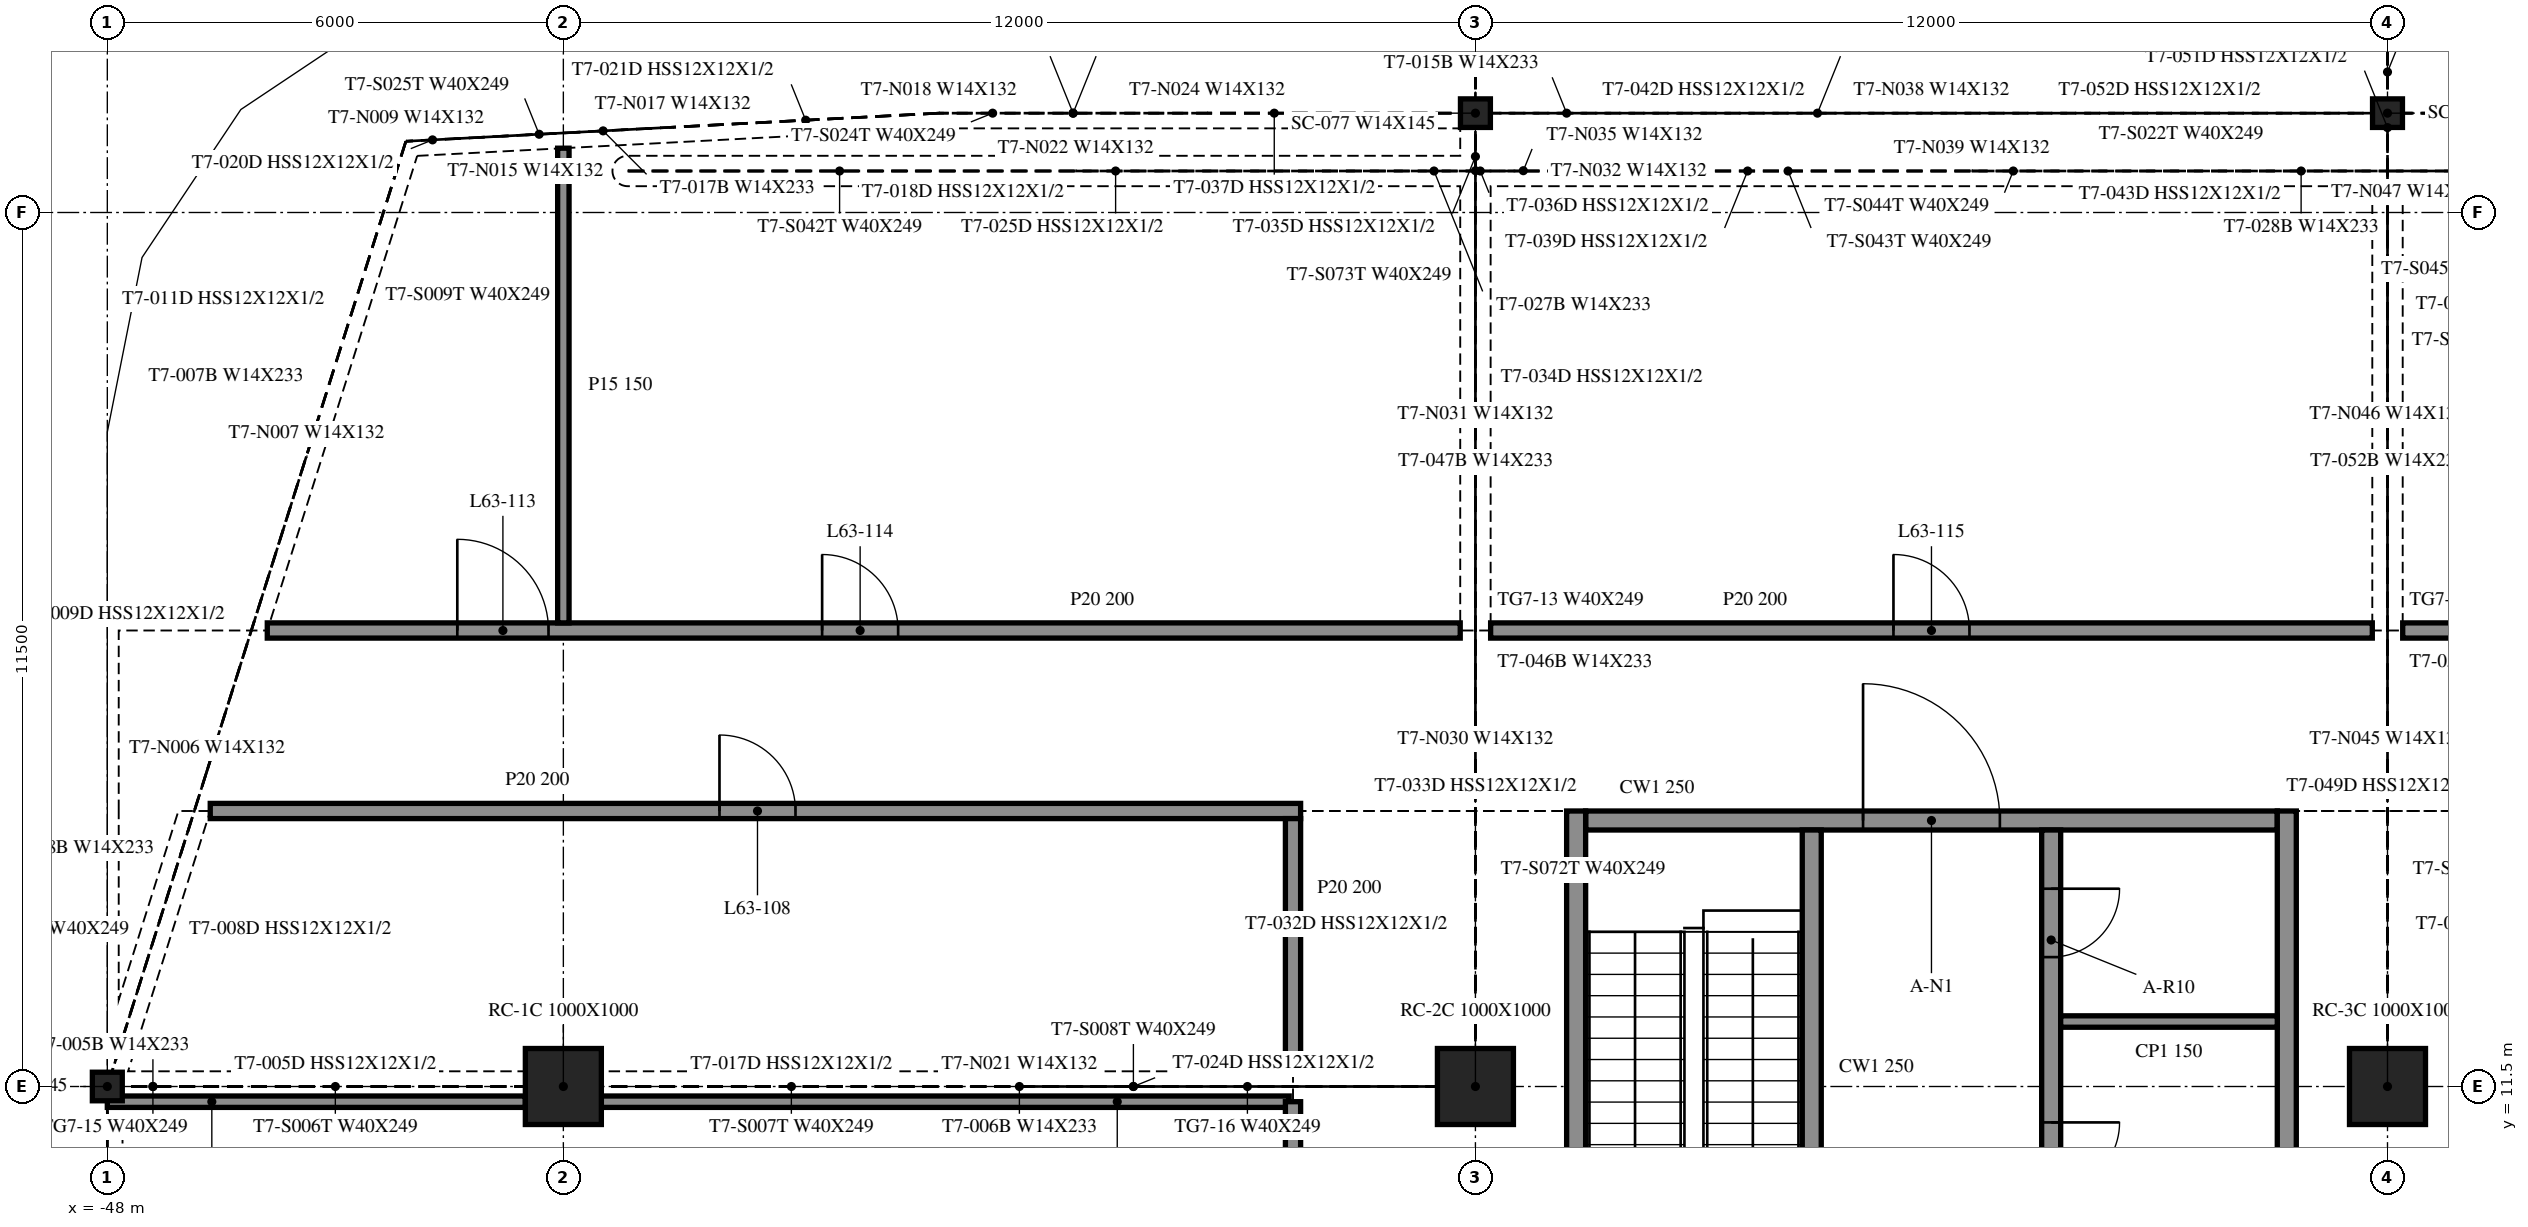
"""IFC4 building model, lengths in metres.
Left out: names, types, materials, properties, quantities, classifications, styles, units other than length and angle.
Written with IfcOpenShell. Run it as: python <this file> out.ifc"""

import sys

from ifc_helpers import new_model, si_unit, direction, frame, frame_2d, origin, origin_2d, place, context, subcontext, project, spatial, rectangle, i_section, extrude, element, fill, save


model = new_model("IFC4")
c1 = context("Model", 3, precision=1e-05, world=origin(), true_north=direction((0.0, 1.0)))
c2 = subcontext(c1, "Body", "Model", "MODEL_VIEW")
j1 = project(units=[si_unit("LENGTHUNIT", "METRE"), si_unit("PLANEANGLEUNIT", "RADIAN")], contexts=[c1])
p1 = place(None, origin())
s1 = spatial("IfcSite", under=j1, at=p1, CompositionType="ELEMENT")
p2 = place(p1, origin())
s2 = spatial("IfcBuilding", under=s1, at=p2, CompositionType="ELEMENT")
p3 = place(p2, frame((0.0, 0.0, 259.0)))
s3 = spatial("IfcBuildingStorey", under=s2, at=p3, CompositionType="ELEMENT", Elevation=259.0)
for number, where, z_axis, x_axis in (
    (1, (-42.0, 11.5, -0.4), (0.0, 0.0, 1.0), (1.0, 0.0, 0.0)),
    (2, (-30.0, 11.5, -0.4), (0.0, 0.0, 1.0), (1.0, 0.0, 0.0)),
    (3, (-18.0, 11.5, -0.4), (0.0, 0.0, 1.0), (1.0, 0.0, 0.0)),
):
    element("IfcColumn", number, at=place(p3, frame(where, z_axis=z_axis, x_axis=x_axis)), inside=s3, PredefinedType="COLUMN", context=c2, shape_type="SweptSolid", body=[
        extrude(rectangle(XDim=1.0, YDim=1.0, at=origin_2d()), origin(), (0.0, 0.0, 1.0), 4.36),
    ])
for number, where, z_axis, x_axis in (
    (4, (-18.0, 24.307, -0.4), (0.0, 0.0, 1.0), (1.0, 0.0, 0.0)),
    (5, (-30.0, 24.307, -0.4), (0.0, 0.0, 1.0), (1.0, 0.0, 0.0)),
    (6, (-48.0, 11.5, -0.4), (0.0, 0.0, 1.0), (1.0, 0.0, 0.0)),
):
    element("IfcColumn", number, at=place(p3, frame(where, z_axis=z_axis, x_axis=x_axis)), inside=s3, PredefinedType="COLUMN", context=c2, shape_type="SweptSolid", body=[
        extrude(i_section(OverallWidth=0.394, OverallDepth=0.376, WebThickness=0.017, FlangeThickness=0.028, at=origin_2d()), origin(), (0.0, 0.0, 1.0), 4.36),
    ])
for number, where, z_axis, x_axis in (
    (7, (-28.675, 15.125, 0.0), (0.0, 0.0, 1.0), (0.0, -1.0, 0.0)),
    (8, (-19.325, -9.125, 0.0), (0.0, 0.0, 1.0), (0.0, 1.0, 0.0)),
):
    element("IfcWall", number, at=place(p3, frame(where, z_axis=z_axis, x_axis=x_axis)), inside=s3, PredefinedType="SOLIDWALL", context=c2, shape_type="SweptSolid", body=[
        extrude(rectangle(XDim=24.25, YDim=0.25, at=frame_2d((12.125, 0.0))), origin(), (0.0, 0.0, 1.0), 3.96),
    ])
p4 = place(p3, frame((-28.55, 15.0, 0.0), z_axis=(0.0, 0.0, 1.0), x_axis=(1.0, 0.0, 0.0)))
e9 = element("IfcWall", 9, at=p4, inside=s3, PredefinedType="SOLIDWALL", context=c2, shape_type="SweptSolid", body=[
    extrude(rectangle(XDim=9.1, YDim=0.25, at=frame_2d((4.55, 0.0))), origin(), (0.0, 0.0, 1.0), 3.96),
])
p5 = place(p4, frame((3.65, 0.0, 0.0)))
e10 = element("IfcOpeningElement", 10, at=p5, cuts=e9, PredefinedType="OPENING", context=c2, shape_type="SweptSolid", body=[
    extrude(rectangle(XDim=1.8, YDim=2.1, at=frame_2d((0.9, 1.05))), frame((0.0, 0.135, 0.0), z_axis=(0.0, -1.0, 0.0), x_axis=(1.0, 0.0, 0.0)), (0.0, 0.0, 1.0), 0.27),
])
p6 = place(p3, frame((-25.575, 14.875, 0.0), z_axis=(0.0, 0.0, 1.0), x_axis=(0.0, -1.0, 0.0)))
e11 = element("IfcWall", 11, at=p6, inside=s3, PredefinedType="SOLIDWALL", context=c2, shape_type="SweptSolid", body=[
    extrude(rectangle(XDim=6.25, YDim=0.25, at=frame_2d((3.125, 0.0))), origin(), (0.0, 0.0, 1.0), 3.96),
])
p7 = place(p6, frame((4.85, 0.0, 0.0)))
e12 = element("IfcOpeningElement", 12, at=p7, cuts=e11, PredefinedType="OPENING", context=c2, shape_type="SweptSolid", body=[
    extrude(rectangle(XDim=1.0, YDim=2.1, at=frame_2d((0.5, 1.05))), frame((0.0, 0.135, 0.0), z_axis=(0.0, -1.0, 0.0), x_axis=(1.0, 0.0, 0.0)), (0.0, 0.0, 1.0), 0.27),
])
p8 = place(p3, frame((-22.425, 14.875, 0.0), z_axis=(0.0, 0.0, 1.0), x_axis=(0.0, -1.0, 0.0)))
e13 = element("IfcWall", 13, at=p8, inside=s3, PredefinedType="SOLIDWALL", context=c2, shape_type="SweptSolid", body=[
    extrude(rectangle(XDim=24.0, YDim=0.25, at=frame_2d((12.0, 0.0))), origin(), (0.0, 0.0, 1.0), 3.96),
])
p9 = place(p8, frame((15.225, 0.0, 0.0)))
e14 = element("IfcOpeningElement", 14, at=p9, cuts=e13, PredefinedType="OPENING", context=c2, shape_type="SweptSolid", body=[
    extrude(rectangle(XDim=0.9, YDim=2.1, at=frame_2d((0.45, 1.05))), frame((0.0, 0.135, 0.0), z_axis=(0.0, -1.0, 0.0), x_axis=(1.0, 0.0, 0.0)), (0.0, 0.0, 1.0), 0.27),
])
p10 = place(p8, frame((11.425, 0.0, 0.0)))
e15 = element("IfcOpeningElement", 15, at=p10, cuts=e13, PredefinedType="OPENING", context=c2, shape_type="SweptSolid", body=[
    extrude(rectangle(XDim=0.9, YDim=2.1, at=frame_2d((0.45, 1.05))), frame((0.0, 0.135, 0.0), z_axis=(0.0, -1.0, 0.0), x_axis=(1.0, 0.0, 0.0)), (0.0, 0.0, 1.0), 0.27),
])
p11 = place(p8, frame((7.625, 0.0, 0.0)))
e16 = element("IfcOpeningElement", 16, at=p11, cuts=e13, PredefinedType="OPENING", context=c2, shape_type="SweptSolid", body=[
    extrude(rectangle(XDim=0.9, YDim=2.1, at=frame_2d((0.45, 1.05))), frame((0.0, 0.135, 0.0), z_axis=(0.0, -1.0, 0.0), x_axis=(1.0, 0.0, 0.0)), (0.0, 0.0, 1.0), 0.27),
])
p12 = place(p8, frame((20.3, 0.0, 0.0)))
e17 = element("IfcOpeningElement", 17, at=p12, cuts=e13, PredefinedType="OPENING", context=c2, shape_type="SweptSolid", body=[
    extrude(rectangle(XDim=0.9, YDim=2.1, at=frame_2d((0.45, 1.05))), frame((0.0, 0.135, 0.0), z_axis=(0.0, -1.0, 0.0), x_axis=(1.0, 0.0, 0.0)), (0.0, 0.0, 1.0), 0.27),
])
p13 = place(p8, frame((3.847, 0.0, 0.0)))
e18 = element("IfcOpeningElement", 18, at=p13, cuts=e13, PredefinedType="OPENING", context=c2, shape_type="SweptSolid", body=[
    extrude(rectangle(XDim=0.9, YDim=2.1, at=frame_2d((0.45, 1.05))), frame((0.0, 0.135, 0.0), z_axis=(0.0, -1.0, 0.0), x_axis=(1.0, 0.0, 0.0)), (0.0, 0.0, 1.0), 0.27),
])
p14 = place(p8, frame((0.772, 0.0, 0.0)))
e19 = element("IfcOpeningElement", 19, at=p14, cuts=e13, PredefinedType="OPENING", context=c2, shape_type="SweptSolid", body=[
    extrude(rectangle(XDim=0.9, YDim=2.1, at=frame_2d((0.45, 1.05))), frame((0.0, 0.135, 0.0), z_axis=(0.0, -1.0, 0.0), x_axis=(1.0, 0.0, 0.0)), (0.0, 0.0, 1.0), 0.27),
])
p15 = place(p3, frame((-22.3, 12.355, 0.0), z_axis=(0.0, 0.0, 1.0), x_axis=(1.0, 0.0, 0.0)))
e20 = element("IfcWall", 20, at=p15, inside=s3, PredefinedType="PARTITIONING", context=c2, shape_type="SweptSolid", body=[
    extrude(rectangle(XDim=2.85, YDim=0.15, at=frame_2d((1.425, 0.0))), origin(), (0.0, 0.0, 1.0), 3.96),
])
p16 = place(p3, frame((-48.0, 11.3, 0.0), z_axis=(0.0, 0.0, 1.0), x_axis=(1.0, 0.0, 0.0)))
e21 = element("IfcWall", 21, at=p16, inside=s3, PredefinedType="PARTITIONING", context=c2, shape_type="SweptSolid", body=[
    extrude(rectangle(XDim=5.5, YDim=0.15, at=frame_2d((2.75, 0.0))), origin(), (0.0, 0.0, 1.0), 3.96),
])
p17 = place(p3, frame((-41.5, 11.3, 0.0), z_axis=(0.0, 0.0, 1.0), x_axis=(1.0, 0.0, 0.0)))
e22 = element("IfcWall", 22, at=p17, inside=s3, PredefinedType="PARTITIONING", context=c2, shape_type="SweptSolid", body=[
    extrude(rectangle(XDim=9.05, YDim=0.15, at=frame_2d((4.525, 0.0))), origin(), (0.0, 0.0, 1.0), 3.96),
])
p18 = place(p3, frame((-46.646, 15.125, 0.0), z_axis=(0.0, 0.0, 1.0), x_axis=(1.0, 0.0, 0.0)))
e23 = element("IfcWall", 23, at=p18, inside=s3, PredefinedType="PARTITIONING", context=c2, shape_type="SweptSolid", body=[
    extrude(rectangle(XDim=14.346, YDim=0.2, at=frame_2d((7.173, 0.0))), origin(), (0.0, 0.0, 1.0), 3.96),
])
p19 = place(p18, frame((6.7, 0.0, 0.0)))
e24 = element("IfcOpeningElement", 24, at=p19, cuts=e23, PredefinedType="OPENING", context=c2, shape_type="SweptSolid", body=[
    extrude(rectangle(XDim=1.0, YDim=2.1, at=frame_2d((0.5, 1.05))), frame((0.0, 0.11, 0.0), z_axis=(0.0, -1.0, 0.0), x_axis=(1.0, 0.0, 0.0)), (0.0, 0.0, 1.0), 0.22),
])
p20 = place(p3, frame((-45.895, 17.5, 0.0), z_axis=(0.0, 0.0, 1.0), x_axis=(1.0, 0.0, 0.0)))
e25 = element("IfcWall", 25, at=p20, inside=s3, PredefinedType="PARTITIONING", context=c2, shape_type="SweptSolid", body=[
    extrude(rectangle(XDim=15.695, YDim=0.2, at=frame_2d((7.848, 0.0))), origin(), (0.0, 0.0, 1.0), 3.96),
])
p21 = place(p20, frame((2.5, 0.0, 0.0)))
e26 = element("IfcOpeningElement", 26, at=p21, cuts=e25, PredefinedType="OPENING", context=c2, shape_type="SweptSolid", body=[
    extrude(rectangle(XDim=1.2, YDim=2.1, at=frame_2d((0.6, 1.05))), frame((0.0, 0.11, 0.0), z_axis=(0.0, -1.0, 0.0), x_axis=(1.0, 0.0, 0.0)), (0.0, 0.0, 1.0), 0.22),
])
p22 = place(p20, frame((7.3, 0.0, 0.0)))
e27 = element("IfcOpeningElement", 27, at=p22, cuts=e25, PredefinedType="OPENING", context=c2, shape_type="SweptSolid", body=[
    extrude(rectangle(XDim=1.0, YDim=2.1, at=frame_2d((0.5, 1.05))), frame((0.0, 0.11, 0.0), z_axis=(0.0, -1.0, 0.0), x_axis=(1.0, 0.0, 0.0)), (0.0, 0.0, 1.0), 0.22),
])
p23 = place(p3, frame((-29.8, 17.5, 0.0), z_axis=(0.0, 0.0, 1.0), x_axis=(1.0, 0.0, 0.0)))
e28 = element("IfcWall", 28, at=p23, inside=s3, PredefinedType="PARTITIONING", context=c2, shape_type="SweptSolid", body=[
    extrude(rectangle(XDim=11.6, YDim=0.2, at=frame_2d((5.8, 0.0))), origin(), (0.0, 0.0, 1.0), 3.96),
])
p24 = place(p23, frame((5.3, 0.0, 0.0)))
e29 = element("IfcOpeningElement", 29, at=p24, cuts=e28, PredefinedType="OPENING", context=c2, shape_type="SweptSolid", body=[
    extrude(rectangle(XDim=1.0, YDim=2.1, at=frame_2d((0.5, 1.05))), frame((0.0, 0.11, 0.0), z_axis=(0.0, -1.0, 0.0), x_axis=(1.0, 0.0, 0.0)), (0.0, 0.0, 1.0), 0.22),
])
p25 = place(p3, frame((-17.8, 17.5, 0.0), z_axis=(0.0, 0.0, 1.0), x_axis=(1.0, 0.0, 0.0)))
e30 = element("IfcWall", 30, at=p25, inside=s3, PredefinedType="PARTITIONING", context=c2, shape_type="SweptSolid", body=[
    extrude(rectangle(XDim=11.6, YDim=0.2, at=frame_2d((5.8, 0.0))), origin(), (0.0, 0.0, 1.0), 3.96),
])
p26 = place(p25, frame((5.3, 0.0, 0.0)))
e31 = element("IfcOpeningElement", 31, at=p26, cuts=e30, PredefinedType="OPENING", context=c2, shape_type="SweptSolid", body=[
    extrude(rectangle(XDim=0.9, YDim=2.1, at=frame_2d((0.45, 1.05))), frame((0.0, 0.11, 0.0), z_axis=(0.0, -1.0, 0.0), x_axis=(1.0, 0.0, 0.0)), (0.0, 0.0, 1.0), 0.22),
])
p27 = place(p3, frame((-42.0, 17.6, 0.0), z_axis=(0.0, 0.0, 1.0), x_axis=(0.0, 1.0, 0.0)))
e32 = element("IfcWall", 32, at=p27, inside=s3, PredefinedType="PARTITIONING", context=c2, shape_type="SweptSolid", body=[
    extrude(rectangle(XDim=6.246, YDim=0.15, at=frame_2d((3.123, 0.0))), origin(), (0.0, 0.0, 1.0), 3.96),
])
p28 = place(p3, frame((-32.4, 0.2, 0.0), z_axis=(0.0, 0.0, 1.0), x_axis=(0.0, 1.0, 0.0)))
e33 = element("IfcWall", 33, at=p28, inside=s3, PredefinedType="PARTITIONING", context=c2, shape_type="SweptSolid", body=[
    extrude(rectangle(XDim=11.1, YDim=0.2, at=frame_2d((5.55, 0.0))), origin(), (0.0, 0.0, 1.0), 3.96),
])
p29 = place(p28, frame((4.9, 0.0, 0.0)))
e34 = element("IfcOpeningElement", 34, at=p29, cuts=e33, PredefinedType="OPENING", context=c2, shape_type="SweptSolid", body=[
    extrude(rectangle(XDim=1.2, YDim=2.1, at=frame_2d((0.6, 1.05))), frame((0.0, 0.11, 0.0), z_axis=(0.0, -1.0, 0.0), x_axis=(1.0, 0.0, 0.0)), (0.0, 0.0, 1.0), 0.22),
])
p30 = place(p3, frame((-32.4, 11.7, 0.0), z_axis=(0.0, 0.0, 1.0), x_axis=(0.0, 1.0, 0.0)))
e35 = element("IfcWall", 35, at=p30, inside=s3, PredefinedType="PARTITIONING", context=c2, shape_type="SweptSolid", body=[
    extrude(rectangle(XDim=3.325, YDim=0.2, at=frame_2d((1.663, 0.0))), origin(), (0.0, 0.0, 1.0), 3.96),
])
p31 = place(p5, origin())
e36 = element("IfcDoor", 36, at=p31, inside=s3, OperationType="DOUBLE_DOOR_SINGLE_SWING", PredefinedType="DOOR", context=c2, shape_type="SweptSolid", body=[
    extrude(rectangle(XDim=1.8, YDim=2.1, at=frame_2d((0.9, 1.05))), frame((0.0, 0.025, 0.0), z_axis=(0.0, -1.0, 0.0), x_axis=(1.0, 0.0, 0.0)), (0.0, 0.0, 1.0), 0.05),
])
fill(e10, e36)
p32 = place(p13, origin())
e37 = element("IfcDoor", 37, at=p32, inside=s3, OperationType="SINGLE_SWING_LEFT", PredefinedType="DOOR", context=c2, shape_type="SweptSolid", body=[
    extrude(rectangle(XDim=0.9, YDim=2.1, at=frame_2d((0.45, 1.05))), frame((0.0, 0.025, 0.0), z_axis=(0.0, -1.0, 0.0), x_axis=(1.0, 0.0, 0.0)), (0.0, 0.0, 1.0), 0.05),
])
fill(e18, e37)
p33 = place(p14, origin())
e38 = element("IfcDoor", 38, at=p33, inside=s3, OperationType="SINGLE_SWING_RIGHT", PredefinedType="DOOR", context=c2, shape_type="SweptSolid", body=[
    extrude(rectangle(XDim=0.9, YDim=2.1, at=frame_2d((0.45, 1.05))), frame((0.0, 0.025, 0.0), z_axis=(0.0, -1.0, 0.0), x_axis=(1.0, 0.0, 0.0)), (0.0, 0.0, 1.0), 0.05),
])
fill(e19, e38)
p34 = place(p19, origin())
e39 = element("IfcDoor", 39, at=p34, inside=s3, OperationType="SINGLE_SWING_LEFT", PredefinedType="DOOR", context=c2, shape_type="SweptSolid", body=[
    extrude(rectangle(XDim=1.0, YDim=2.1, at=frame_2d((0.5, 1.05))), frame((0.0, 0.025, 0.0), z_axis=(0.0, -1.0, 0.0), x_axis=(1.0, 0.0, 0.0)), (0.0, 0.0, 1.0), 0.05),
])
fill(e24, e39)
p35 = place(p21, origin())
e40 = element("IfcDoor", 40, at=p35, inside=s3, OperationType="SINGLE_SWING_LEFT", PredefinedType="DOOR", context=c2, shape_type="SweptSolid", body=[
    extrude(rectangle(XDim=1.2, YDim=2.1, at=frame_2d((0.6, 1.05))), frame((0.0, 0.025, 0.0), z_axis=(0.0, -1.0, 0.0), x_axis=(1.0, 0.0, 0.0)), (0.0, 0.0, 1.0), 0.05),
])
fill(e26, e40)
p36 = place(p22, origin())
e41 = element("IfcDoor", 41, at=p36, inside=s3, OperationType="SINGLE_SWING_LEFT", PredefinedType="DOOR", context=c2, shape_type="SweptSolid", body=[
    extrude(rectangle(XDim=1.0, YDim=2.1, at=frame_2d((0.5, 1.05))), frame((0.0, 0.025, 0.0), z_axis=(0.0, -1.0, 0.0), x_axis=(1.0, 0.0, 0.0)), (0.0, 0.0, 1.0), 0.05),
])
fill(e27, e41)
p37 = place(p24, origin())
e42 = element("IfcDoor", 42, at=p37, inside=s3, OperationType="SINGLE_SWING_LEFT", PredefinedType="DOOR", context=c2, shape_type="SweptSolid", body=[
    extrude(rectangle(XDim=1.0, YDim=2.1, at=frame_2d((0.5, 1.05))), frame((0.0, 0.025, 0.0), z_axis=(0.0, -1.0, 0.0), x_axis=(1.0, 0.0, 0.0)), (0.0, 0.0, 1.0), 0.05),
])
fill(e29, e42)
save(model, sys.argv[1])
